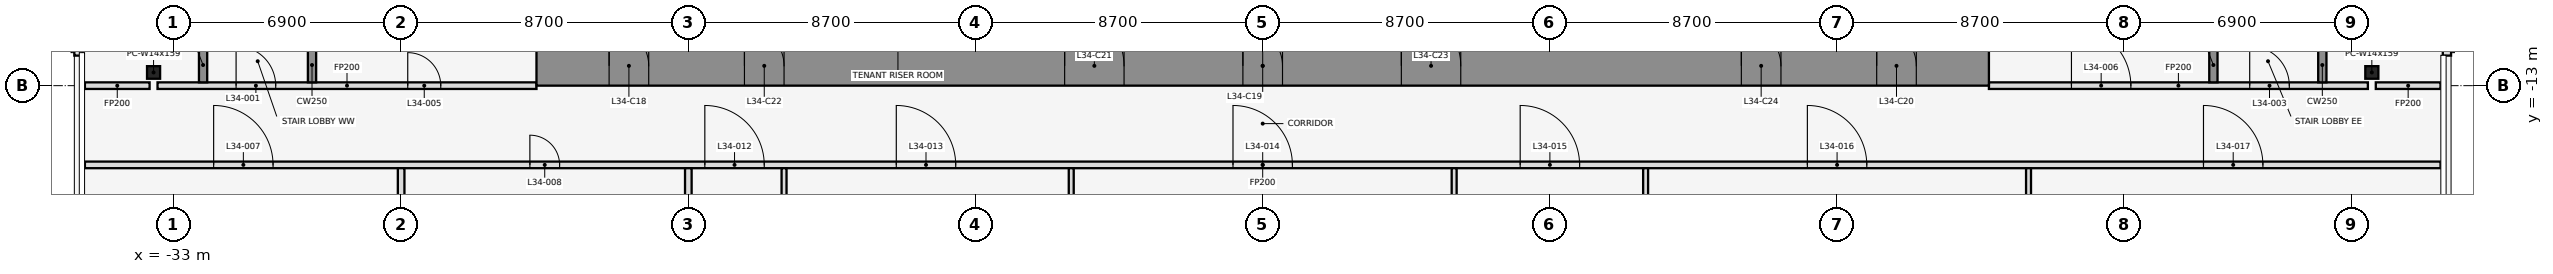
"""IFC4 building model, lengths in metres.
Left out: names, types, materials, properties, quantities, classifications, styles, units other than length and angle.
Written with IfcOpenShell. Run it as: python <this file> out.ifc"""

import sys

from ifc_helpers import new_model, si_unit, direction, frame, frame_2d, origin, origin_2d, place, context, subcontext, project, spatial, rectangle, i_section, extrude, element, fill, save


model = new_model("IFC4")
c1 = context("Model", 3, precision=1e-05, world=origin(), true_north=direction((0.0, 1.0)))
c2 = subcontext(c1, "Body", "Model", "MODEL_VIEW")
j1 = project(units=[si_unit("LENGTHUNIT", "METRE"), si_unit("PLANEANGLEUNIT", "RADIAN")], contexts=[c1])
p1 = place(None, origin())
s1 = spatial("IfcSite", under=j1, at=p1, CompositionType="ELEMENT")
p2 = place(p1, origin())
s2 = spatial("IfcBuilding", under=s1, at=p2, CompositionType="ELEMENT")
p3 = place(p2, frame((0.0, 0.0, 156.8)))
s3 = spatial("IfcBuildingStorey", under=s2, at=p3, CompositionType="ELEMENT", Elevation=156.8)
for number, where, z_axis, x_axis in (
    (1, (-33.6, -12.6, 0.0), (0.0, 0.0, 1.0), (1.0, 0.0, 0.0)),
    (2, (33.6, -12.6, 0.0), (0.0, 0.0, 1.0), (1.0, 0.0, 0.0)),
):
    element("IfcColumn", number, at=place(p3, frame(where, z_axis=z_axis, x_axis=x_axis)), inside=s3, PredefinedType="COLUMN", context=c2, shape_type="SweptSolid", body=[
        extrude(i_section(OverallWidth=0.396, OverallDepth=0.381, WebThickness=0.019, FlangeThickness=0.03, at=origin_2d()), origin(), (0.0, 0.0, 1.0), 4.1),
    ])
for number, where, z_axis, x_axis in (
    (3, (-35.875, -3.0, 0.0), (0.0, 0.0, 1.0), (0.0, -1.0, 0.0)),
    (4, (35.875, -12.09, 0.0), (0.0, 0.0, 1.0), (0.0, 1.0, 0.0)),
):
    element("IfcWall", number, at=place(p3, frame(where, z_axis=z_axis, x_axis=x_axis)), inside=s3, PredefinedType="STANDARD", context=c2, shape_type="SweptSolid", body=[
        extrude(rectangle(XDim=9.09, YDim=0.25, at=frame_2d((4.545, 0.0))), origin(), (0.0, 0.0, 1.0), 3.95),
    ])
p4 = place(p3, frame((-35.68, -15.4, 0.0), z_axis=(0.0, 0.0, 1.0), x_axis=(1.0, 0.0, 0.0)))
e5 = element("IfcWall", 5, at=p4, inside=s3, PredefinedType="PARTITIONING", context=c2, shape_type="SweptSolid", body=[
    extrude(rectangle(XDim=71.36, YDim=0.2, at=frame_2d((35.68, 0.0))), origin(), (0.0, 0.0, 1.0), 2.84),
])
p5 = place(p4, frame((3.9, 0.0, 0.0)))
e6 = element("IfcOpeningElement", 6, at=p5, cuts=e5, PredefinedType="OPENING", context=c2, shape_type="SweptSolid", body=[
    extrude(rectangle(XDim=1.8, YDim=2.1, at=frame_2d((0.9, 1.05))), frame((0.0, 0.112, 0.0), z_axis=(0.0, -1.0, 0.0), x_axis=(1.0, 0.0, 0.0)), (0.0, 0.0, 1.0), 0.224),
])
p6 = place(p4, frame((13.48, 0.0, 0.0)))
e7 = element("IfcOpeningElement", 7, at=p6, cuts=e5, PredefinedType="OPENING", context=c2, shape_type="SweptSolid", body=[
    extrude(rectangle(XDim=0.9, YDim=2.1, at=frame_2d((0.45, 1.05))), frame((0.0, 0.112, 0.0), z_axis=(0.0, -1.0, 0.0), x_axis=(1.0, 0.0, 0.0)), (0.0, 0.0, 1.0), 0.224),
])
p7 = place(p4, frame((18.78, 0.0, 0.0)))
e8 = element("IfcOpeningElement", 8, at=p7, cuts=e5, PredefinedType="OPENING", context=c2, shape_type="SweptSolid", body=[
    extrude(rectangle(XDim=1.8, YDim=2.1, at=frame_2d((0.9, 1.05))), frame((0.0, 0.112, 0.0), z_axis=(0.0, -1.0, 0.0), x_axis=(1.0, 0.0, 0.0)), (0.0, 0.0, 1.0), 0.224),
])
p8 = place(p4, frame((24.58, 0.0, 0.0)))
e9 = element("IfcOpeningElement", 9, at=p8, cuts=e5, PredefinedType="OPENING", context=c2, shape_type="SweptSolid", body=[
    extrude(rectangle(XDim=1.8, YDim=2.1, at=frame_2d((0.9, 1.05))), frame((0.0, 0.112, 0.0), z_axis=(0.0, -1.0, 0.0), x_axis=(1.0, 0.0, 0.0)), (0.0, 0.0, 1.0), 0.224),
])
p9 = place(p4, frame((34.78, 0.0, 0.0)))
e10 = element("IfcOpeningElement", 10, at=p9, cuts=e5, PredefinedType="OPENING", context=c2, shape_type="SweptSolid", body=[
    extrude(rectangle(XDim=1.8, YDim=2.1, at=frame_2d((0.9, 1.05))), frame((0.0, 0.112, 0.0), z_axis=(0.0, -1.0, 0.0), x_axis=(1.0, 0.0, 0.0)), (0.0, 0.0, 1.0), 0.224),
])
p10 = place(p4, frame((43.48, 0.0, 0.0)))
e11 = element("IfcOpeningElement", 11, at=p10, cuts=e5, PredefinedType="OPENING", context=c2, shape_type="SweptSolid", body=[
    extrude(rectangle(XDim=1.8, YDim=2.1, at=frame_2d((0.9, 1.05))), frame((0.0, 0.112, 0.0), z_axis=(0.0, -1.0, 0.0), x_axis=(1.0, 0.0, 0.0)), (0.0, 0.0, 1.0), 0.224),
])
p11 = place(p4, frame((52.18, 0.0, 0.0)))
e12 = element("IfcOpeningElement", 12, at=p11, cuts=e5, PredefinedType="OPENING", context=c2, shape_type="SweptSolid", body=[
    extrude(rectangle(XDim=1.8, YDim=2.1, at=frame_2d((0.9, 1.05))), frame((0.0, 0.112, 0.0), z_axis=(0.0, -1.0, 0.0), x_axis=(1.0, 0.0, 0.0)), (0.0, 0.0, 1.0), 0.224),
])
p12 = place(p4, frame((64.18, 0.0, 0.0)))
e13 = element("IfcOpeningElement", 13, at=p12, cuts=e5, PredefinedType="OPENING", context=c2, shape_type="SweptSolid", body=[
    extrude(rectangle(XDim=1.8, YDim=2.1, at=frame_2d((0.9, 1.05))), frame((0.0, 0.112, 0.0), z_axis=(0.0, -1.0, 0.0), x_axis=(1.0, 0.0, 0.0)), (0.0, 0.0, 1.0), 0.224),
])
p13 = place(p3, frame((-35.68, -13.0, 0.0), z_axis=(0.0, 0.0, 1.0), x_axis=(1.0, 0.0, 0.0)))
e14 = element("IfcWall", 14, at=p13, inside=s3, PredefinedType="PARTITIONING", context=c2, shape_type="SweptSolid", body=[
    extrude(rectangle(XDim=1.96, YDim=0.2, at=frame_2d((0.98, 0.0))), origin(), (0.0, 0.0, 1.0), 2.84),
])
p14 = place(p3, frame((-33.48, -13.0, 0.0), z_axis=(0.0, 0.0, 1.0), x_axis=(1.0, 0.0, 0.0)))
e15 = element("IfcWall", 15, at=p14, inside=s3, PredefinedType="PARTITIONING", context=c2, shape_type="SweptSolid", body=[
    extrude(rectangle(XDim=11.48, YDim=0.2, at=frame_2d((5.74, 0.0))), origin(), (0.0, 0.0, 1.0), 2.84),
])
p15 = place(p14, frame((2.38, 0.0, 0.0)))
e16 = element("IfcOpeningElement", 16, at=p15, cuts=e15, PredefinedType="OPENING", context=c2, shape_type="SweptSolid", body=[
    extrude(rectangle(XDim=1.2, YDim=2.1, at=frame_2d((0.6, 1.05))), frame((0.0, 0.112, 0.0), z_axis=(0.0, -1.0, 0.0), x_axis=(1.0, 0.0, 0.0)), (0.0, 0.0, 1.0), 0.224),
])
p16 = place(p14, frame((7.58, 0.0, 0.0)))
e17 = element("IfcOpeningElement", 17, at=p16, cuts=e15, PredefinedType="OPENING", context=c2, shape_type="SweptSolid", body=[
    extrude(rectangle(XDim=1.0, YDim=2.1, at=frame_2d((0.5, 1.05))), frame((0.0, 0.112, 0.0), z_axis=(0.0, -1.0, 0.0), x_axis=(1.0, 0.0, 0.0)), (0.0, 0.0, 1.0), 0.224),
])
p17 = place(p3, frame((22.0, -13.0, 0.0), z_axis=(0.0, 0.0, 1.0), x_axis=(1.0, 0.0, 0.0)))
e18 = element("IfcWall", 18, at=p17, inside=s3, PredefinedType="PARTITIONING", context=c2, shape_type="SweptSolid", body=[
    extrude(rectangle(XDim=11.48, YDim=0.2, at=frame_2d((5.74, 0.0))), origin(), (0.0, 0.0, 1.0), 2.84),
])
p18 = place(p17, frame((7.9, 0.0, 0.0)))
e19 = element("IfcOpeningElement", 19, at=p18, cuts=e18, PredefinedType="OPENING", context=c2, shape_type="SweptSolid", body=[
    extrude(rectangle(XDim=1.2, YDim=2.1, at=frame_2d((0.6, 1.05))), frame((0.0, 0.112, 0.0), z_axis=(0.0, -1.0, 0.0), x_axis=(1.0, 0.0, 0.0)), (0.0, 0.0, 1.0), 0.224),
])
p19 = place(p17, frame((2.5, 0.0, 0.0)))
e20 = element("IfcOpeningElement", 20, at=p19, cuts=e18, PredefinedType="OPENING", context=c2, shape_type="SweptSolid", body=[
    extrude(rectangle(XDim=1.8, YDim=2.1, at=frame_2d((0.9, 1.05))), frame((0.0, 0.112, 0.0), z_axis=(0.0, -1.0, 0.0), x_axis=(1.0, 0.0, 0.0)), (0.0, 0.0, 1.0), 0.224),
])
p20 = place(p3, frame((33.72, -13.0, 0.0), z_axis=(0.0, 0.0, 1.0), x_axis=(1.0, 0.0, 0.0)))
e21 = element("IfcWall", 21, at=p20, inside=s3, PredefinedType="PARTITIONING", context=c2, shape_type="SweptSolid", body=[
    extrude(rectangle(XDim=1.96, YDim=0.2, at=frame_2d((0.98, 0.0))), origin(), (0.0, 0.0, 1.0), 2.84),
])
for number, where, z_axis, x_axis in (
    (22, (-32.1, -12.9, 0.0), (0.0, 0.0, 1.0), (0.0, 1.0, 0.0)),
    (23, (-28.8, -12.9, 0.0), (0.0, 0.0, 1.0), (0.0, 1.0, 0.0)),
):
    element("IfcWall", number, at=place(p3, frame(where, z_axis=z_axis, x_axis=x_axis)), inside=s3, PredefinedType="SHEAR", context=c2, shape_type="SweptSolid", body=[
        extrude(rectangle(XDim=1.05, YDim=0.25, at=frame_2d((0.525, 0.0))), origin(), (0.0, 0.0, 1.0), 4.1),
    ])
p21 = place(p3, frame((-26.1, -34.96, 0.0), z_axis=(0.0, 0.0, 1.0), x_axis=(0.0, 1.0, 0.0)))
e24 = element("IfcWall", 24, at=p21, inside=s3, PredefinedType="PARTITIONING", context=c2, shape_type="SweptSolid", body=[
    extrude(rectangle(XDim=19.46, YDim=0.2, at=frame_2d((9.73, 0.0))), origin(), (0.0, 0.0, 1.0), 2.84),
])
p22 = place(p3, frame((-17.4, -21.725, 0.0), z_axis=(0.0, 0.0, 1.0), x_axis=(0.0, 1.0, 0.0)))
e25 = element("IfcWall", 25, at=p22, inside=s3, PredefinedType="PARTITIONING", context=c2, shape_type="SweptSolid", body=[
    extrude(rectangle(XDim=6.225, YDim=0.2, at=frame_2d((3.113, 0.0))), origin(), (0.0, 0.0, 1.0), 2.84),
])
p23 = place(p3, frame((-14.5, -33.44, 0.0), z_axis=(0.0, 0.0, 1.0), x_axis=(0.0, 1.0, 0.0)))
e26 = element("IfcWall", 26, at=p23, inside=s3, PredefinedType="PARTITIONING", context=c2, shape_type="SweptSolid", body=[
    extrude(rectangle(XDim=17.94, YDim=0.15, at=frame_2d((8.97, 0.0))), origin(), (0.0, 0.0, 1.0), 2.84),
])
for number, where, z_axis, x_axis in (
    (27, (-5.8, -37.67, 0.0), (0.0, 0.0, 1.0), (0.0, 1.0, 0.0)),
    (28, (5.8, -37.67, 0.0), (0.0, 0.0, 1.0), (0.0, 1.0, 0.0)),
):
    element("IfcWall", number, at=place(p3, frame(where, z_axis=z_axis, x_axis=x_axis)), inside=s3, PredefinedType="PARTITIONING", context=c2, shape_type="SweptSolid", body=[
        extrude(rectangle(XDim=22.17, YDim=0.15, at=frame_2d((11.085, 0.0))), origin(), (0.0, 0.0, 1.0), 2.84),
    ])
p24 = place(p3, frame((11.6, -34.855, 0.0), z_axis=(0.0, 0.0, 1.0), x_axis=(0.0, 1.0, 0.0)))
e29 = element("IfcWall", 29, at=p24, inside=s3, PredefinedType="PARTITIONING", context=c2, shape_type="SweptSolid", body=[
    extrude(rectangle(XDim=19.355, YDim=0.15, at=frame_2d((9.677, 0.0))), origin(), (0.0, 0.0, 1.0), 2.84),
])
p25 = place(p3, frame((23.2, -34.96, 0.0), z_axis=(0.0, 0.0, 1.0), x_axis=(0.0, 1.0, 0.0)))
e30 = element("IfcWall", 30, at=p25, inside=s3, PredefinedType="PARTITIONING", context=c2, shape_type="SweptSolid", body=[
    extrude(rectangle(XDim=19.46, YDim=0.15, at=frame_2d((9.73, 0.0))), origin(), (0.0, 0.0, 1.0), 2.84),
])
for number, where, z_axis, x_axis in (
    (31, (28.8, -12.9, 0.0), (0.0, 0.0, 1.0), (0.0, 1.0, 0.0)),
    (32, (32.1, -12.9, 0.0), (0.0, 0.0, 1.0), (0.0, 1.0, 0.0)),
):
    element("IfcWall", number, at=place(p3, frame(where, z_axis=z_axis, x_axis=x_axis)), inside=s3, PredefinedType="SHEAR", context=c2, shape_type="SweptSolid", body=[
        extrude(rectangle(XDim=1.05, YDim=0.25, at=frame_2d((0.525, 0.0))), origin(), (0.0, 0.0, 1.0), 4.1),
    ])
p26 = place(p3, frame((-22.0, -12.4, 0.0), z_axis=(0.0, 0.0, 1.0), x_axis=(1.0, 0.0, 0.0)))
e33 = element("IfcWall", 33, at=p26, inside=s3, PredefinedType="SHEAR", context=c2, shape_type="SweptSolid", body=[
    extrude(rectangle(XDim=44.0, YDim=1.2, at=frame_2d((22.0, 0.0))), origin(), (0.0, 0.0, 1.0), 4.1),
])
p27 = place(p26, frame((2.2, 0.0, 0.0)))
e34 = element("IfcOpeningElement", 34, at=p27, cuts=e33, PredefinedType="OPENING", context=c2, shape_type="SweptSolid", body=[
    extrude(rectangle(XDim=1.2, YDim=2.1, at=frame_2d((0.6, 1.05))), frame((0.0, 0.612, 0.0), z_axis=(0.0, -1.0, 0.0), x_axis=(1.0, 0.0, 0.0)), (0.0, 0.0, 1.0), 1.224),
])
p28 = place(p26, frame((21.4, 0.0, 0.0)))
e35 = element("IfcOpeningElement", 35, at=p28, cuts=e33, PredefinedType="OPENING", context=c2, shape_type="SweptSolid", body=[
    extrude(rectangle(XDim=1.2, YDim=2.1, at=frame_2d((0.6, 1.05))), frame((0.0, 0.612, 0.0), z_axis=(0.0, -1.0, 0.0), x_axis=(1.0, 0.0, 0.0)), (0.0, 0.0, 1.0), 1.224),
])
p29 = place(p26, frame((40.6, 0.0, 0.0)))
e36 = element("IfcOpeningElement", 36, at=p29, cuts=e33, PredefinedType="OPENING", context=c2, shape_type="SweptSolid", body=[
    extrude(rectangle(XDim=1.2, YDim=2.1, at=frame_2d((0.6, 1.05))), frame((0.0, 0.612, 0.0), z_axis=(0.0, -1.0, 0.0), x_axis=(1.0, 0.0, 0.0)), (0.0, 0.0, 1.0), 1.224),
])
p30 = place(p26, frame((16.0, 0.0, 0.0)))
e37 = element("IfcOpeningElement", 37, at=p30, cuts=e33, PredefinedType="OPENING", context=c2, shape_type="SweptSolid", body=[
    extrude(rectangle(XDim=1.8, YDim=2.1, at=frame_2d((0.9, 1.05))), frame((0.0, 0.612, 0.0), z_axis=(0.0, -1.0, 0.0), x_axis=(1.0, 0.0, 0.0)), (0.0, 0.0, 1.0), 1.224),
])
p31 = place(p26, frame((6.3, 0.0, 0.0)))
e38 = element("IfcOpeningElement", 38, at=p31, cuts=e33, PredefinedType="OPENING", context=c2, shape_type="SweptSolid", body=[
    extrude(rectangle(XDim=1.2, YDim=2.1, at=frame_2d((0.6, 1.05))), frame((0.0, 0.612, 0.0), z_axis=(0.0, -1.0, 0.0), x_axis=(1.0, 0.0, 0.0)), (0.0, 0.0, 1.0), 1.224),
])
p32 = place(p26, frame((26.2, 0.0, 0.0)))
e39 = element("IfcOpeningElement", 39, at=p32, cuts=e33, PredefinedType="OPENING", context=c2, shape_type="SweptSolid", body=[
    extrude(rectangle(XDim=1.8, YDim=2.1, at=frame_2d((0.9, 1.05))), frame((0.0, 0.612, 0.0), z_axis=(0.0, -1.0, 0.0), x_axis=(1.0, 0.0, 0.0)), (0.0, 0.0, 1.0), 1.224),
])
p33 = place(p26, frame((36.5, 0.0, 0.0)))
e40 = element("IfcOpeningElement", 40, at=p33, cuts=e33, PredefinedType="OPENING", context=c2, shape_type="SweptSolid", body=[
    extrude(rectangle(XDim=1.2, YDim=2.1, at=frame_2d((0.6, 1.05))), frame((0.0, 0.612, 0.0), z_axis=(0.0, -1.0, 0.0), x_axis=(1.0, 0.0, 0.0)), (0.0, 0.0, 1.0), 1.224),
])
p34 = place(p15, origin())
e41 = element("IfcDoor", 41, at=p34, inside=s3, OperationType="SINGLE_SWING_LEFT", PredefinedType="DOOR", context=c2, shape_type="SweptSolid", body=[
    extrude(rectangle(XDim=1.2, YDim=2.1, at=frame_2d((0.6, 1.05))), frame((0.0, 0.025, 0.0), z_axis=(0.0, -1.0, 0.0), x_axis=(1.0, 0.0, 0.0)), (0.0, 0.0, 1.0), 0.05),
])
fill(e16, e41)
p35 = place(p18, origin())
e42 = element("IfcDoor", 42, at=p35, inside=s3, OperationType="SINGLE_SWING_RIGHT", PredefinedType="DOOR", context=c2, shape_type="SweptSolid", body=[
    extrude(rectangle(XDim=1.2, YDim=2.1, at=frame_2d((0.6, 1.05))), frame((0.0, 0.025, 0.0), z_axis=(0.0, -1.0, 0.0), x_axis=(1.0, 0.0, 0.0)), (0.0, 0.0, 1.0), 0.05),
])
fill(e19, e42)
p36 = place(p16, origin())
e43 = element("IfcDoor", 43, at=p36, inside=s3, OperationType="SINGLE_SWING_LEFT", PredefinedType="DOOR", context=c2, shape_type="SweptSolid", body=[
    extrude(rectangle(XDim=1.0, YDim=2.1, at=frame_2d((0.5, 1.05))), frame((0.0, 0.025, 0.0), z_axis=(0.0, -1.0, 0.0), x_axis=(1.0, 0.0, 0.0)), (0.0, 0.0, 1.0), 0.05),
])
fill(e17, e43)
p37 = place(p19, origin())
e44 = element("IfcDoor", 44, at=p37, inside=s3, OperationType="SINGLE_SWING_LEFT", PredefinedType="DOOR", context=c2, shape_type="SweptSolid", body=[
    extrude(rectangle(XDim=1.8, YDim=2.1, at=frame_2d((0.9, 1.05))), frame((0.0, 0.025, 0.0), z_axis=(0.0, -1.0, 0.0), x_axis=(1.0, 0.0, 0.0)), (0.0, 0.0, 1.0), 0.05),
])
fill(e20, e44)
p38 = place(p5, origin())
e45 = element("IfcDoor", 45, at=p38, inside=s3, OperationType="SINGLE_SWING_LEFT", PredefinedType="DOOR", context=c2, shape_type="SweptSolid", body=[
    extrude(rectangle(XDim=1.8, YDim=2.1, at=frame_2d((0.9, 1.05))), frame((0.0, 0.025, 0.0), z_axis=(0.0, -1.0, 0.0), x_axis=(1.0, 0.0, 0.0)), (0.0, 0.0, 1.0), 0.05),
])
fill(e6, e45)
p39 = place(p6, frame((0.9, 0.0, 0.0), z_axis=(0.0, 0.0, 1.0), x_axis=(-1.0, 0.0, 0.0)))
e46 = element("IfcDoor", 46, at=p39, inside=s3, OperationType="SINGLE_SWING_RIGHT", PredefinedType="DOOR", context=c2, shape_type="SweptSolid", body=[
    extrude(rectangle(XDim=0.9, YDim=2.1, at=frame_2d((0.45, 1.05))), frame((0.0, 0.025, 0.0), z_axis=(0.0, -1.0, 0.0), x_axis=(1.0, 0.0, 0.0)), (0.0, 0.0, 1.0), 0.05),
])
fill(e7, e46)
p40 = place(p7, origin())
e47 = element("IfcDoor", 47, at=p40, inside=s3, OperationType="SINGLE_SWING_LEFT", PredefinedType="DOOR", context=c2, shape_type="SweptSolid", body=[
    extrude(rectangle(XDim=1.8, YDim=2.1, at=frame_2d((0.9, 1.05))), frame((0.0, 0.025, 0.0), z_axis=(0.0, -1.0, 0.0), x_axis=(1.0, 0.0, 0.0)), (0.0, 0.0, 1.0), 0.05),
])
fill(e8, e47)
p41 = place(p8, origin())
e48 = element("IfcDoor", 48, at=p41, inside=s3, OperationType="SINGLE_SWING_LEFT", PredefinedType="DOOR", context=c2, shape_type="SweptSolid", body=[
    extrude(rectangle(XDim=1.8, YDim=2.1, at=frame_2d((0.9, 1.05))), frame((0.0, 0.025, 0.0), z_axis=(0.0, -1.0, 0.0), x_axis=(1.0, 0.0, 0.0)), (0.0, 0.0, 1.0), 0.05),
])
fill(e9, e48)
p42 = place(p9, origin())
e49 = element("IfcDoor", 49, at=p42, inside=s3, OperationType="SINGLE_SWING_LEFT", PredefinedType="DOOR", context=c2, shape_type="SweptSolid", body=[
    extrude(rectangle(XDim=1.8, YDim=2.1, at=frame_2d((0.9, 1.05))), frame((0.0, 0.025, 0.0), z_axis=(0.0, -1.0, 0.0), x_axis=(1.0, 0.0, 0.0)), (0.0, 0.0, 1.0), 0.05),
])
fill(e10, e49)
p43 = place(p10, origin())
e50 = element("IfcDoor", 50, at=p43, inside=s3, OperationType="SINGLE_SWING_LEFT", PredefinedType="DOOR", context=c2, shape_type="SweptSolid", body=[
    extrude(rectangle(XDim=1.8, YDim=2.1, at=frame_2d((0.9, 1.05))), frame((0.0, 0.025, 0.0), z_axis=(0.0, -1.0, 0.0), x_axis=(1.0, 0.0, 0.0)), (0.0, 0.0, 1.0), 0.05),
])
fill(e11, e50)
p44 = place(p11, origin())
e51 = element("IfcDoor", 51, at=p44, inside=s3, OperationType="SINGLE_SWING_LEFT", PredefinedType="DOOR", context=c2, shape_type="SweptSolid", body=[
    extrude(rectangle(XDim=1.8, YDim=2.1, at=frame_2d((0.9, 1.05))), frame((0.0, 0.025, 0.0), z_axis=(0.0, -1.0, 0.0), x_axis=(1.0, 0.0, 0.0)), (0.0, 0.0, 1.0), 0.05),
])
fill(e12, e51)
p45 = place(p12, origin())
e52 = element("IfcDoor", 52, at=p45, inside=s3, OperationType="SINGLE_SWING_LEFT", PredefinedType="DOOR", context=c2, shape_type="SweptSolid", body=[
    extrude(rectangle(XDim=1.8, YDim=2.1, at=frame_2d((0.9, 1.05))), frame((0.0, 0.025, 0.0), z_axis=(0.0, -1.0, 0.0), x_axis=(1.0, 0.0, 0.0)), (0.0, 0.0, 1.0), 0.05),
])
fill(e13, e52)
p46 = place(p27, frame((1.2, 0.0, 0.0), z_axis=(0.0, 0.0, 1.0), x_axis=(-1.0, 0.0, 0.0)))
e53 = element("IfcDoor", 53, at=p46, inside=s3, OperationType="SINGLE_SWING_RIGHT", PredefinedType="DOOR", context=c2, shape_type="SweptSolid", body=[
    extrude(rectangle(XDim=1.2, YDim=2.1, at=frame_2d((0.6, 1.05))), frame((0.0, 0.025, 0.0), z_axis=(0.0, -1.0, 0.0), x_axis=(1.0, 0.0, 0.0)), (0.0, 0.0, 1.0), 0.05),
])
fill(e34, e53)
p47 = place(p28, frame((1.2, 0.0, 0.0), z_axis=(0.0, 0.0, 1.0), x_axis=(-1.0, 0.0, 0.0)))
e54 = element("IfcDoor", 54, at=p47, inside=s3, OperationType="SINGLE_SWING_RIGHT", PredefinedType="DOOR", context=c2, shape_type="SweptSolid", body=[
    extrude(rectangle(XDim=1.2, YDim=2.1, at=frame_2d((0.6, 1.05))), frame((0.0, 0.025, 0.0), z_axis=(0.0, -1.0, 0.0), x_axis=(1.0, 0.0, 0.0)), (0.0, 0.0, 1.0), 0.05),
])
fill(e35, e54)
p48 = place(p29, frame((1.2, 0.0, 0.0), z_axis=(0.0, 0.0, 1.0), x_axis=(-1.0, 0.0, 0.0)))
e55 = element("IfcDoor", 55, at=p48, inside=s3, OperationType="SINGLE_SWING_RIGHT", PredefinedType="DOOR", context=c2, shape_type="SweptSolid", body=[
    extrude(rectangle(XDim=1.2, YDim=2.1, at=frame_2d((0.6, 1.05))), frame((0.0, 0.025, 0.0), z_axis=(0.0, -1.0, 0.0), x_axis=(1.0, 0.0, 0.0)), (0.0, 0.0, 1.0), 0.05),
])
fill(e36, e55)
p49 = place(p30, origin())
e56 = element("IfcDoor", 56, at=p49, inside=s3, OperationType="SINGLE_SWING_LEFT", PredefinedType="DOOR", context=c2, shape_type="SweptSolid", body=[
    extrude(rectangle(XDim=1.8, YDim=2.1, at=frame_2d((0.9, 1.05))), frame((0.0, 0.025, 0.0), z_axis=(0.0, -1.0, 0.0), x_axis=(1.0, 0.0, 0.0)), (0.0, 0.0, 1.0), 0.05),
])
fill(e37, e56)
p50 = place(p31, frame((1.2, 0.0, 0.0), z_axis=(0.0, 0.0, 1.0), x_axis=(-1.0, 0.0, 0.0)))
e57 = element("IfcDoor", 57, at=p50, inside=s3, OperationType="SINGLE_SWING_RIGHT", PredefinedType="DOOR", context=c2, shape_type="SweptSolid", body=[
    extrude(rectangle(XDim=1.2, YDim=2.1, at=frame_2d((0.6, 1.05))), frame((0.0, 0.025, 0.0), z_axis=(0.0, -1.0, 0.0), x_axis=(1.0, 0.0, 0.0)), (0.0, 0.0, 1.0), 0.05),
])
fill(e38, e57)
p51 = place(p32, origin())
e58 = element("IfcDoor", 58, at=p51, inside=s3, OperationType="SINGLE_SWING_LEFT", PredefinedType="DOOR", context=c2, shape_type="SweptSolid", body=[
    extrude(rectangle(XDim=1.8, YDim=2.1, at=frame_2d((0.9, 1.05))), frame((0.0, 0.025, 0.0), z_axis=(0.0, -1.0, 0.0), x_axis=(1.0, 0.0, 0.0)), (0.0, 0.0, 1.0), 0.05),
])
fill(e39, e58)
p52 = place(p33, frame((1.2, 0.0, 0.0), z_axis=(0.0, 0.0, 1.0), x_axis=(-1.0, 0.0, 0.0)))
e59 = element("IfcDoor", 59, at=p52, inside=s3, OperationType="SINGLE_SWING_RIGHT", PredefinedType="DOOR", context=c2, shape_type="SweptSolid", body=[
    extrude(rectangle(XDim=1.2, YDim=2.1, at=frame_2d((0.6, 1.05))), frame((0.0, 0.025, 0.0), z_axis=(0.0, -1.0, 0.0), x_axis=(1.0, 0.0, 0.0)), (0.0, 0.0, 1.0), 0.05),
])
fill(e40, e59)
save(model, sys.argv[1])
